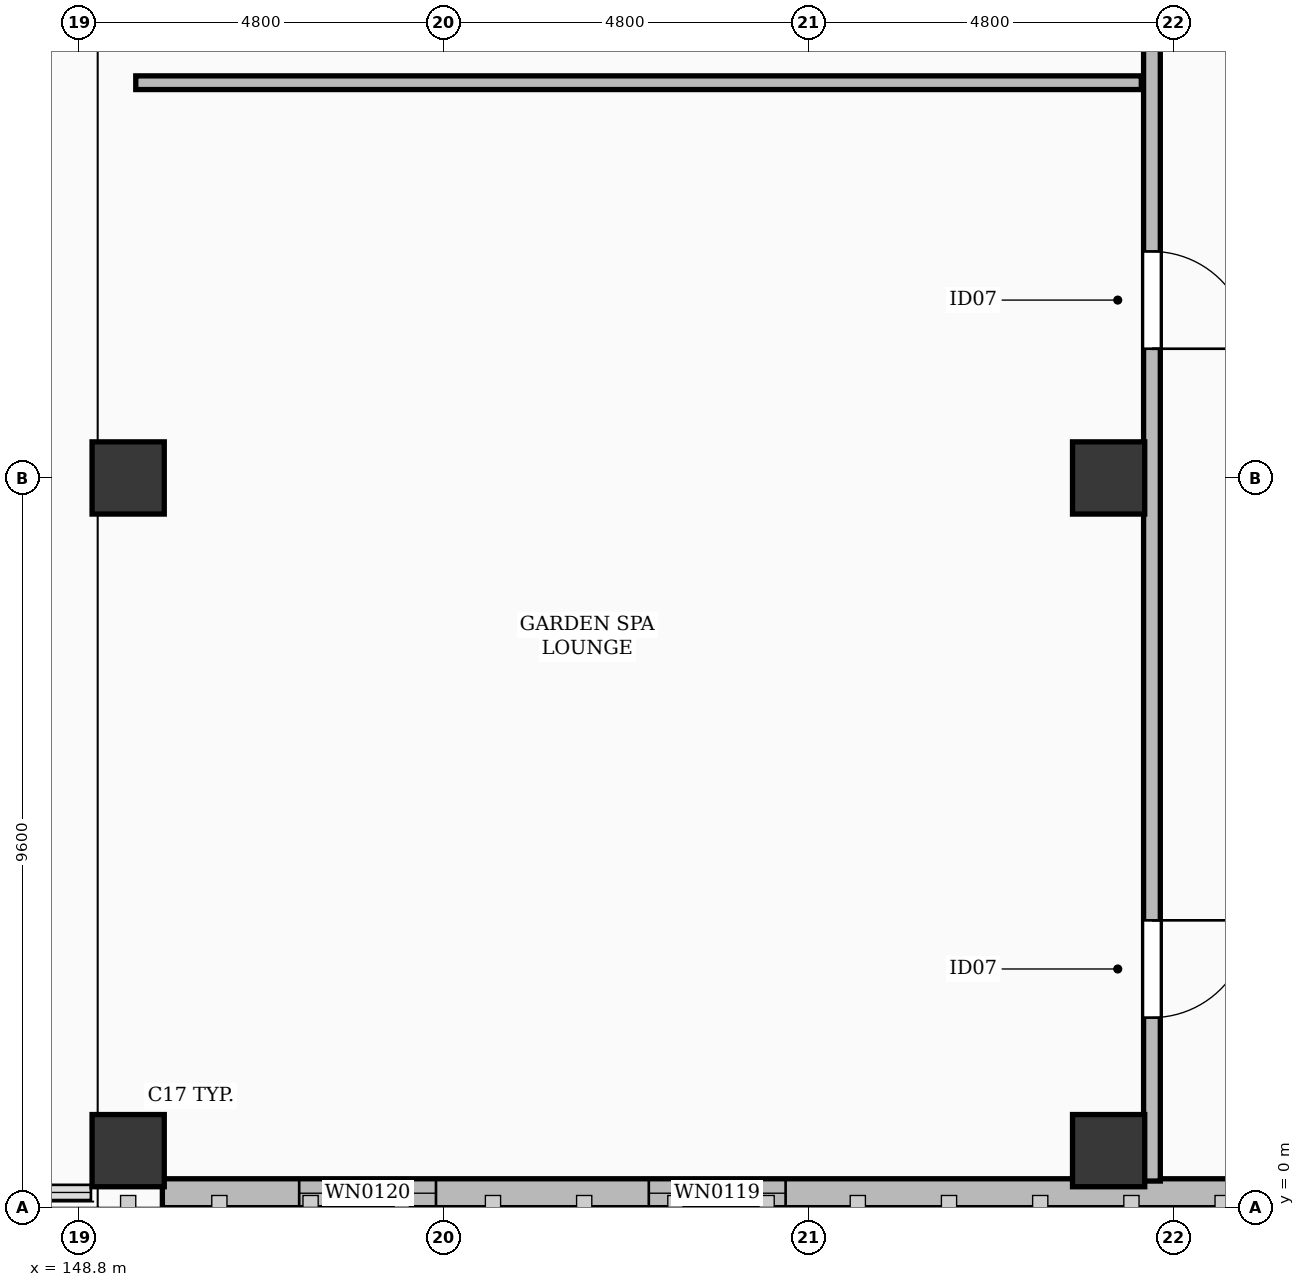
"""IFC4 building model, lengths in metres.
Left out: names, types, materials, properties, quantities, classifications, styles, units other than length and angle.
Written with IfcOpenShell. Run it as: python <this file> out.ifc"""

import sys

from ifc_helpers import new_model, si_unit, direction, frame, frame_2d, origin, origin_2d, place, context, subcontext, project, spatial, rectangle, extrude, element, fill, save


model = new_model("IFC4")
c1 = context("Model", 3, precision=1e-05, world=origin(), true_north=direction((0.0, 1.0)))
c2 = subcontext(c1, "Body", "Model", "MODEL_VIEW")
j1 = project(units=[si_unit("LENGTHUNIT", "METRE"), si_unit("PLANEANGLEUNIT", "RADIAN")], contexts=[c1])
p1 = place(None, origin())
s1 = spatial("IfcSite", under=j1, at=p1, CompositionType="ELEMENT")
p2 = place(p1, origin())
s2 = spatial("IfcBuilding", under=s1, at=p2, CompositionType="ELEMENT")
p3 = place(p2, frame((0.0, 0.0, 11.4)))
s3 = spatial("IfcBuildingStorey", under=s2, at=p3, CompositionType="ELEMENT", Elevation=11.4)
for number, where, z_axis, x_axis in (
    (1, (149.45, 0.75, 0.0), (0.0, 0.0, 1.0), (1.0, 0.0, 0.0)),
    (2, (149.45, 9.6, 0.0), (0.0, 0.0, 1.0), (1.0, 0.0, 0.0)),
    (3, (162.35, 0.75, 0.0), (0.0, 0.0, 1.0), (1.0, 0.0, 0.0)),
    (4, (162.35, 9.6, 0.0), (0.0, 0.0, 1.0), (1.0, 0.0, 0.0)),
):
    element("IfcColumn", number, at=place(p3, frame(where, z_axis=z_axis, x_axis=x_axis)), inside=s3, PredefinedType="COLUMN", context=c2, shape_type="SweptSolid", body=[
        extrude(rectangle(XDim=0.95, YDim=0.95, at=origin_2d()), origin(), (0.0, 0.0, 1.0), 4.8),
    ])
p4 = place(p3, frame((178.9, 0.19, 0.0), z_axis=(0.0, 0.0, 1.0), x_axis=(-1.0, 0.0, 0.0)))
e5 = element("IfcWall", 5, at=p4, inside=s3, PredefinedType="SOLIDWALL", context=c2, shape_type="SweptSolid", body=[
    extrude(rectangle(XDim=29.0, YDim=0.38, at=frame_2d((14.5, 0.0))), origin(), (0.0, 0.0, 1.0), 4.42),
])
p5 = place(p4, frame((4.0, 0.0, 0.55)))
e6 = element("IfcOpeningElement", 6, at=p5, cuts=e5, PredefinedType="OPENING", context=c2, shape_type="SweptSolid", body=[
    extrude(rectangle(XDim=1.8, YDim=1.76, at=frame_2d((0.9, 0.88))), frame((0.0, 0.202, 0.0), z_axis=(0.0, -1.0, 0.0), x_axis=(1.0, 0.0, 0.0)), (0.0, 0.0, 1.0), 0.404),
])
p6 = place(p4, frame((9.6, 0.0, 0.55)))
e7 = element("IfcOpeningElement", 7, at=p6, cuts=e5, PredefinedType="OPENING", context=c2, shape_type="SweptSolid", body=[
    extrude(rectangle(XDim=1.8, YDim=1.76, at=frame_2d((0.9, 0.88))), frame((0.0, 0.202, 0.0), z_axis=(0.0, -1.0, 0.0), x_axis=(1.0, 0.0, 0.0)), (0.0, 0.0, 1.0), 0.404),
])
p7 = place(p4, frame((20.8, 0.0, 0.55)))
e8 = element("IfcOpeningElement", 8, at=p7, cuts=e5, PredefinedType="OPENING", context=c2, shape_type="SweptSolid", body=[
    extrude(rectangle(XDim=1.8, YDim=1.76, at=frame_2d((0.9, 0.88))), frame((0.0, 0.202, 0.0), z_axis=(0.0, -1.0, 0.0), x_axis=(1.0, 0.0, 0.0)), (0.0, 0.0, 1.0), 0.404),
])
p8 = place(p4, frame((25.4, 0.0, 0.55)))
e9 = element("IfcOpeningElement", 9, at=p8, cuts=e5, PredefinedType="OPENING", context=c2, shape_type="SweptSolid", body=[
    extrude(rectangle(XDim=1.8, YDim=1.76, at=frame_2d((0.9, 0.88))), frame((0.0, 0.202, 0.0), z_axis=(0.0, -1.0, 0.0), x_axis=(1.0, 0.0, 0.0)), (0.0, 0.0, 1.0), 0.404),
])
p9 = place(p3, frame((162.92, 0.35, 0.0), z_axis=(0.0, 0.0, 1.0), x_axis=(0.0, 1.0, 0.0)))
e10 = element("IfcWall", 10, at=p9, inside=s3, PredefinedType="PARTITIONING", context=c2, shape_type="SweptSolid", body=[
    extrude(rectangle(XDim=72.85, YDim=0.22, at=frame_2d((36.425, 0.0))), origin(), (0.0, 0.0, 1.0), 3.662),
])
p10 = place(p9, frame((2.15, 0.0, 0.0)))
e11 = element("IfcOpeningElement", 11, at=p10, cuts=e10, PredefinedType="OPENING", context=c2, shape_type="SweptSolid", body=[
    extrude(rectangle(XDim=1.28, YDim=2.16, at=frame_2d((0.64, 1.08))), frame((0.0, 0.122, 0.0), z_axis=(0.0, -1.0, 0.0), x_axis=(1.0, 0.0, 0.0)), (0.0, 0.0, 1.0), 0.244),
])
p11 = place(p9, frame((10.95, 0.0, 0.0)))
e12 = element("IfcOpeningElement", 12, at=p11, cuts=e10, PredefinedType="OPENING", context=c2, shape_type="SweptSolid", body=[
    extrude(rectangle(XDim=1.28, YDim=2.16, at=frame_2d((0.64, 1.08))), frame((0.0, 0.122, 0.0), z_axis=(0.0, -1.0, 0.0), x_axis=(1.0, 0.0, 0.0)), (0.0, 0.0, 1.0), 0.244),
])
p12 = place(p9, frame((15.95, 0.0, 0.0)))
e13 = element("IfcOpeningElement", 13, at=p12, cuts=e10, PredefinedType="OPENING", context=c2, shape_type="SweptSolid", body=[
    extrude(rectangle(XDim=1.05, YDim=2.18, at=frame_2d((0.525, 1.09))), frame((0.0, 0.122, 0.0), z_axis=(0.0, -1.0, 0.0), x_axis=(1.0, 0.0, 0.0)), (0.0, 0.0, 1.0), 0.244),
])
p13 = place(p9, frame((39.55, 0.0, 0.0)))
e14 = element("IfcOpeningElement", 14, at=p13, cuts=e10, PredefinedType="OPENING", context=c2, shape_type="SweptSolid", body=[
    extrude(rectangle(XDim=1.05, YDim=2.18, at=frame_2d((0.525, 1.09))), frame((0.0, 0.122, 0.0), z_axis=(0.0, -1.0, 0.0), x_axis=(1.0, 0.0, 0.0)), (0.0, 0.0, 1.0), 0.244),
])
p14 = place(p9, frame((44.75, 0.0, 0.0)))
e15 = element("IfcOpeningElement", 15, at=p14, cuts=e10, PredefinedType="OPENING", context=c2, shape_type="SweptSolid", body=[
    extrude(rectangle(XDim=1.05, YDim=2.22, at=frame_2d((0.525, 1.11))), frame((0.0, 0.122, 0.0), z_axis=(0.0, -1.0, 0.0), x_axis=(1.0, 0.0, 0.0)), (0.0, 0.0, 1.0), 0.244),
])
p15 = place(p9, frame((69.55, 0.0, 0.0)))
e16 = element("IfcOpeningElement", 16, at=p15, cuts=e10, PredefinedType="OPENING", context=c2, shape_type="SweptSolid", body=[
    extrude(rectangle(XDim=1.05, YDim=2.22, at=frame_2d((0.525, 1.11))), frame((0.0, 0.122, 0.0), z_axis=(0.0, -1.0, 0.0), x_axis=(1.0, 0.0, 0.0)), (0.0, 0.0, 1.0), 0.244),
])
p16 = place(p3, frame((149.55, 14.8, 0.0), z_axis=(0.0, 0.0, 1.0), x_axis=(1.0, 0.0, 0.0)))
e17 = element("IfcWall", 17, at=p16, inside=s3, PredefinedType="PARTITIONING", context=c2, shape_type="SweptSolid", body=[
    extrude(rectangle(XDim=13.23, YDim=0.18, at=frame_2d((6.615, 0.0))), origin(), (0.0, 0.0, 1.0), 3.692),
])
p17 = place(p7, origin())
e18 = element("IfcWindow", 18, at=p17, inside=s3, PartitioningType="SINGLE_PANEL", PredefinedType="WINDOW", context=c2, shape_type="SweptSolid", body=[
    extrude(rectangle(XDim=1.8, YDim=1.76, at=frame_2d((0.9, 0.88))), frame((0.0, 0.03, 0.0), z_axis=(0.0, -1.0, 0.0), x_axis=(1.0, 0.0, 0.0)), (0.0, 0.0, 1.0), 0.06),
])
fill(e8, e18)
p18 = place(p8, origin())
e19 = element("IfcWindow", 19, at=p18, inside=s3, PartitioningType="SINGLE_PANEL", PredefinedType="WINDOW", context=c2, shape_type="SweptSolid", body=[
    extrude(rectangle(XDim=1.8, YDim=1.76, at=frame_2d((0.9, 0.88))), frame((0.0, 0.03, 0.0), z_axis=(0.0, -1.0, 0.0), x_axis=(1.0, 0.0, 0.0)), (0.0, 0.0, 1.0), 0.06),
])
fill(e9, e19)
p19 = place(p10, frame((1.28, 0.0, 0.0), z_axis=(0.0, 0.0, 1.0), x_axis=(-1.0, 0.0, 0.0)))
e20 = element("IfcDoor", 20, at=p19, inside=s3, OperationType="SINGLE_SWING_RIGHT", PredefinedType="DOOR", context=c2, shape_type="SweptSolid", body=[
    extrude(rectangle(XDim=1.28, YDim=2.16, at=frame_2d((0.64, 1.08))), frame((0.0, 0.025, 0.0), z_axis=(0.0, -1.0, 0.0), x_axis=(1.0, 0.0, 0.0)), (0.0, 0.0, 1.0), 0.05),
])
fill(e11, e20)
p20 = place(p11, frame((1.28, 0.0, 0.0), z_axis=(0.0, 0.0, 1.0), x_axis=(-1.0, 0.0, 0.0)))
e21 = element("IfcDoor", 21, at=p20, inside=s3, OperationType="SINGLE_SWING_LEFT", PredefinedType="DOOR", context=c2, shape_type="SweptSolid", body=[
    extrude(rectangle(XDim=1.28, YDim=2.16, at=frame_2d((0.64, 1.08))), frame((0.0, 0.025, 0.0), z_axis=(0.0, -1.0, 0.0), x_axis=(1.0, 0.0, 0.0)), (0.0, 0.0, 1.0), 0.05),
])
fill(e12, e21)
save(model, sys.argv[1])
